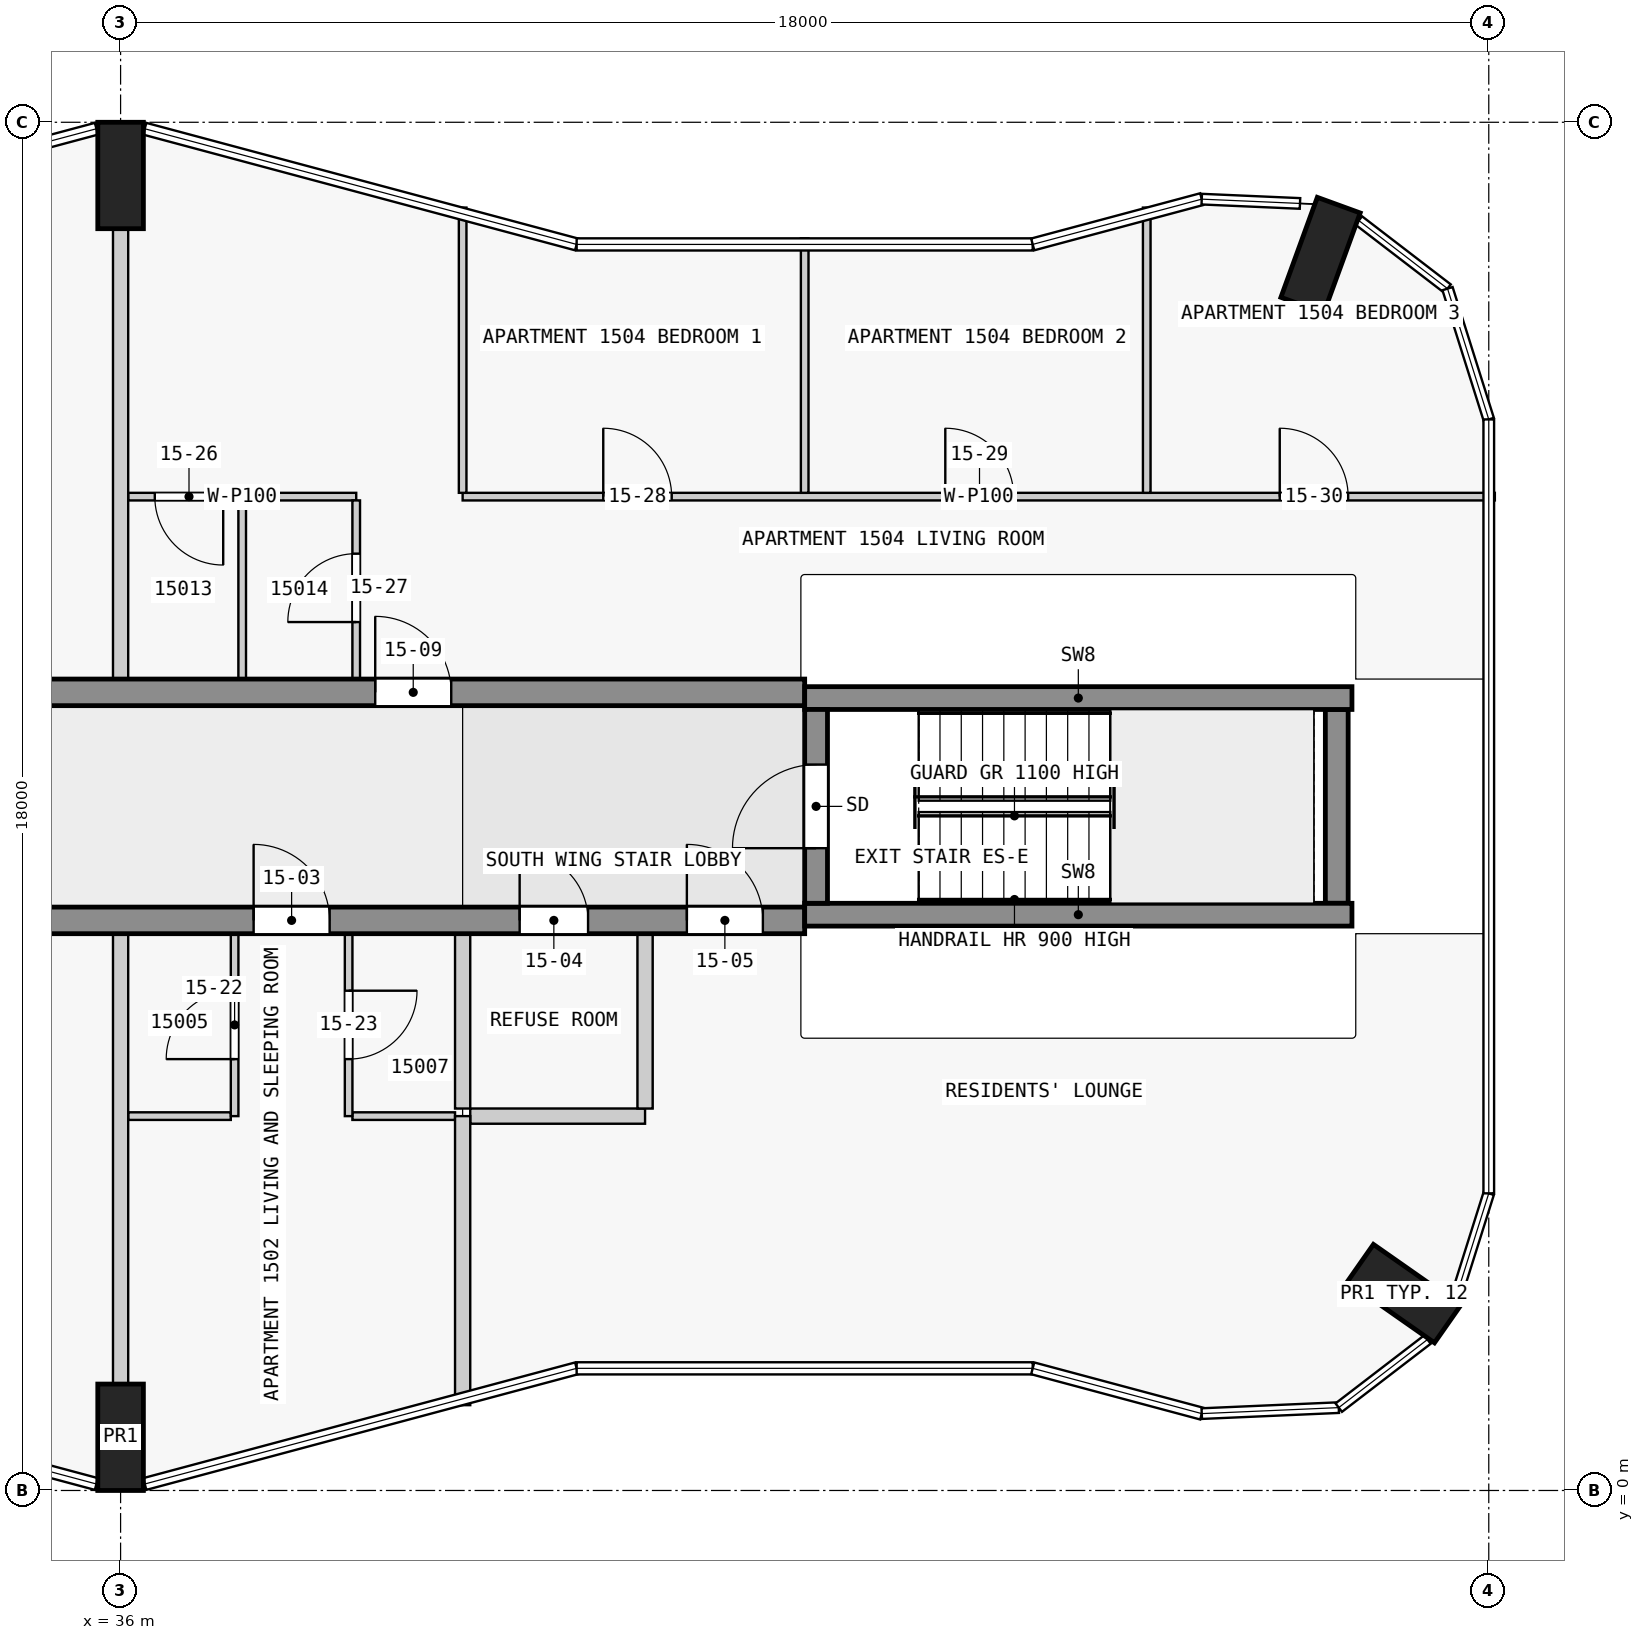
"""IFC4 building model, lengths in metres.
Left out: names, types, materials, properties, quantities, classifications, styles, units other than length and angle.
Written with IfcOpenShell. Run it as: python <this file> out.ifc"""

import sys

from ifc_helpers import new_model, si_unit, direction, frame, frame_2d, origin, origin_2d, place, context, subcontext, project, spatial, rectangle, extrude, element, fill, save


model = new_model("IFC4")
c1 = context("Model", 3, precision=1e-05, world=origin(), true_north=direction((0.0, 1.0)))
c2 = subcontext(c1, "Body", "Model", "MODEL_VIEW")
j1 = project(units=[si_unit("LENGTHUNIT", "METRE"), si_unit("PLANEANGLEUNIT", "RADIAN")], contexts=[c1])
p1 = place(None, origin())
s1 = spatial("IfcSite", under=j1, at=p1, CompositionType="ELEMENT")
p2 = place(p1, origin())
s2 = spatial("IfcBuilding", under=s1, at=p2, CompositionType="ELEMENT")
p3 = place(p2, frame((0.0, 0.0, 61.8)))
s3 = spatial("IfcBuildingStorey", under=s2, at=p3, CompositionType="ELEMENT", Elevation=61.8)
for number, where, z_axis, x_axis in (
    (1, (36.0, 0.7, 0.0), (0.0, 0.0, 1.0), (1.0, 0.0, 0.0)),
    (2, (52.884, 2.59, 0.0), (0.0, 0.0, 1.0), (0.574, 0.819, 0.0)),
    (3, (51.787, 16.252, 0.0), (0.0, 0.0, 1.0), (-0.94, 0.342, 0.0)),
    (4, (36.0, 17.3, 0.0), (0.0, 0.0, 1.0), (1.0, 0.0, 0.0)),
):
    element("IfcColumn", number, at=place(p3, frame(where, z_axis=z_axis, x_axis=x_axis)), inside=s3, PredefinedType="COLUMN", context=c2, shape_type="SweptSolid", body=[
        extrude(rectangle(XDim=0.6, YDim=1.4, at=origin_2d()), origin(), (0.0, 0.0, 1.0), 3.5),
    ])
p4 = place(p3, frame((45.15, 7.725, 0.0), z_axis=(0.0, 0.0, 1.0), x_axis=(0.0, 1.0, 0.0)))
e5 = element("IfcWall", 5, at=p4, inside=s3, PredefinedType="SHEAR", context=c2, shape_type="SweptSolid", body=[
    extrude(rectangle(XDim=2.55, YDim=0.3, at=frame_2d((1.275, 0.0))), origin(), (0.0, 0.0, 1.0), 3.5),
])
p5 = place(p4, frame((0.725, 0.0, 0.0)))
e6 = element("IfcOpeningElement", 6, at=p5, cuts=e5, PredefinedType="OPENING", context=c2, shape_type="SweptSolid", body=[
    extrude(rectangle(XDim=1.1, YDim=2.1, at=frame_2d((0.55, 1.05))), frame((0.0, 0.16, 0.0), z_axis=(0.0, -1.0, 0.0), x_axis=(1.0, 0.0, 0.0)), (0.0, 0.0, 1.0), 0.32),
])
p6 = place(p3, frame((52.0, 7.725, 0.0), z_axis=(0.0, 0.0, 1.0), x_axis=(0.0, 1.0, 0.0)))
e7 = element("IfcWall", 7, at=p6, inside=s3, PredefinedType="SHEAR", context=c2, shape_type="SweptSolid", body=[
    extrude(rectangle(XDim=2.55, YDim=0.3, at=frame_2d((1.275, 0.0))), origin(), (0.0, 0.0, 1.0), 3.5),
])
for number, where, z_axis, x_axis in (
    (8, (45.0, 7.575, 0.0), (0.0, 0.0, 1.0), (1.0, 0.0, 0.0)),
    (9, (45.0, 10.425, 0.0), (0.0, 0.0, 1.0), (1.0, 0.0, 0.0)),
):
    element("IfcWall", number, at=place(p3, frame(where, z_axis=z_axis, x_axis=x_axis)), inside=s3, PredefinedType="SHEAR", context=c2, shape_type="SweptSolid", body=[
        extrude(rectangle(XDim=7.2, YDim=0.3, at=frame_2d((3.6, 0.0))), origin(), (0.0, 0.0, 1.0), 3.5),
    ])
p7 = place(p3, frame((22.5, 7.5, 0.0), z_axis=(0.0, 0.0, 1.0), x_axis=(1.0, 0.0, 0.0)))
e10 = element("IfcWall", 10, at=p7, inside=s3, PredefinedType="SHEAR", context=c2, shape_type="SweptSolid", body=[
    extrude(rectangle(XDim=22.5, YDim=0.35, at=frame_2d((11.25, 0.0))), origin(), (0.0, 0.0, 1.0), 3.25),
])
p8 = place(p7, frame((1.75, 0.0, 0.0)))
e11 = element("IfcOpeningElement", 11, at=p8, cuts=e10, PredefinedType="OPENING", context=c2, shape_type="SweptSolid", body=[
    extrude(rectangle(XDim=1.0, YDim=2.1, at=frame_2d((0.5, 1.05))), frame((0.0, 0.185, 0.0), z_axis=(0.0, -1.0, 0.0), x_axis=(1.0, 0.0, 0.0)), (0.0, 0.0, 1.0), 0.37),
])
p9 = place(p7, frame((8.55, 0.0, 0.0)))
e12 = element("IfcOpeningElement", 12, at=p9, cuts=e10, PredefinedType="OPENING", context=c2, shape_type="SweptSolid", body=[
    extrude(rectangle(XDim=1.0, YDim=2.1, at=frame_2d((0.5, 1.05))), frame((0.0, 0.185, 0.0), z_axis=(0.0, -1.0, 0.0), x_axis=(1.0, 0.0, 0.0)), (0.0, 0.0, 1.0), 0.37),
])
p10 = place(p7, frame((15.25, 0.0, 0.0)))
e13 = element("IfcOpeningElement", 13, at=p10, cuts=e10, PredefinedType="OPENING", context=c2, shape_type="SweptSolid", body=[
    extrude(rectangle(XDim=1.0, YDim=2.1, at=frame_2d((0.5, 1.05))), frame((0.0, 0.185, 0.0), z_axis=(0.0, -1.0, 0.0), x_axis=(1.0, 0.0, 0.0)), (0.0, 0.0, 1.0), 0.37),
])
p11 = place(p7, frame((18.75, 0.0, 0.0)))
e14 = element("IfcOpeningElement", 14, at=p11, cuts=e10, PredefinedType="OPENING", context=c2, shape_type="SweptSolid", body=[
    extrude(rectangle(XDim=0.9, YDim=2.1, at=frame_2d((0.45, 1.05))), frame((0.0, 0.185, 0.0), z_axis=(0.0, -1.0, 0.0), x_axis=(1.0, 0.0, 0.0)), (0.0, 0.0, 1.0), 0.37),
])
p12 = place(p7, frame((20.95, 0.0, 0.0)))
e15 = element("IfcOpeningElement", 15, at=p12, cuts=e10, PredefinedType="OPENING", context=c2, shape_type="SweptSolid", body=[
    extrude(rectangle(XDim=1.0, YDim=2.1, at=frame_2d((0.5, 1.05))), frame((0.0, 0.185, 0.0), z_axis=(0.0, -1.0, 0.0), x_axis=(1.0, 0.0, 0.0)), (0.0, 0.0, 1.0), 0.37),
])
p13 = place(p3, frame((22.5, 10.5, 0.0), z_axis=(0.0, 0.0, 1.0), x_axis=(1.0, 0.0, 0.0)))
e16 = element("IfcWall", 16, at=p13, inside=s3, PredefinedType="SHEAR", context=c2, shape_type="SweptSolid", body=[
    extrude(rectangle(XDim=22.5, YDim=0.35, at=frame_2d((11.25, 0.0))), origin(), (0.0, 0.0, 1.0), 3.25),
])
p14 = place(p13, frame((1.75, 0.0, 0.0)))
e17 = element("IfcOpeningElement", 17, at=p14, cuts=e16, PredefinedType="OPENING", context=c2, shape_type="SweptSolid", body=[
    extrude(rectangle(XDim=1.0, YDim=2.1, at=frame_2d((0.5, 1.05))), frame((0.0, 0.185, 0.0), z_axis=(0.0, -1.0, 0.0), x_axis=(1.0, 0.0, 0.0)), (0.0, 0.0, 1.0), 0.37),
])
p15 = place(p13, frame((6.25, 0.0, 0.0)))
e18 = element("IfcOpeningElement", 18, at=p15, cuts=e16, PredefinedType="OPENING", context=c2, shape_type="SweptSolid", body=[
    extrude(rectangle(XDim=1.0, YDim=2.1, at=frame_2d((0.5, 1.05))), frame((0.0, 0.185, 0.0), z_axis=(0.0, -1.0, 0.0), x_axis=(1.0, 0.0, 0.0)), (0.0, 0.0, 1.0), 0.37),
])
p16 = place(p13, frame((10.75, 0.0, 0.0)))
e19 = element("IfcOpeningElement", 19, at=p16, cuts=e16, PredefinedType="OPENING", context=c2, shape_type="SweptSolid", body=[
    extrude(rectangle(XDim=1.0, YDim=2.1, at=frame_2d((0.5, 1.05))), frame((0.0, 0.185, 0.0), z_axis=(0.0, -1.0, 0.0), x_axis=(1.0, 0.0, 0.0)), (0.0, 0.0, 1.0), 0.37),
])
p17 = place(p13, frame((16.85, 0.0, 0.0)))
e20 = element("IfcOpeningElement", 20, at=p17, cuts=e16, PredefinedType="OPENING", context=c2, shape_type="SweptSolid", body=[
    extrude(rectangle(XDim=1.0, YDim=2.1, at=frame_2d((0.5, 1.05))), frame((0.0, 0.185, 0.0), z_axis=(0.0, -1.0, 0.0), x_axis=(1.0, 0.0, 0.0)), (0.0, 0.0, 1.0), 0.37),
])
for number, where, z_axis, x_axis in (
    (21, (36.1, 4.925, 0.0), (0.0, 0.0, 1.0), (1.0, 0.0, 0.0)),
    (22, (39.05, 4.925, 0.0), (0.0, 0.0, 1.0), (1.0, 0.0, 0.0)),
):
    element("IfcWall", number, at=place(p3, frame(where, z_axis=z_axis, x_axis=x_axis)), inside=s3, PredefinedType="PARTITIONING", context=c2, shape_type="SweptSolid", body=[
        extrude(rectangle(XDim=1.35, YDim=0.1, at=frame_2d((0.675, 0.0))), origin(), (0.0, 0.0, 1.0), 3.25),
    ])
p18 = place(p3, frame((40.6, 4.925, 0.0), z_axis=(0.0, 0.0, 1.0), x_axis=(1.0, 0.0, 0.0)))
e23 = element("IfcWall", 23, at=p18, inside=s3, PredefinedType="PARTITIONING", context=c2, shape_type="SweptSolid", body=[
    extrude(rectangle(XDim=2.3, YDim=0.2, at=frame_2d((1.15, 0.0))), origin(), (0.0, 0.0, 1.0), 3.25),
])
p19 = place(p3, frame((39.1, 13.075, 0.0), z_axis=(0.0, 0.0, 1.0), x_axis=(-1.0, 0.0, 0.0)))
e24 = element("IfcWall", 24, at=p19, inside=s3, PredefinedType="PARTITIONING", context=c2, shape_type="SweptSolid", body=[
    extrude(rectangle(XDim=3.0, YDim=0.1, at=frame_2d((1.5, 0.0))), origin(), (0.0, 0.0, 1.0), 3.25),
])
p20 = place(p19, frame((1.75, 0.0, 0.0)))
e25 = element("IfcOpeningElement", 25, at=p20, cuts=e24, PredefinedType="OPENING", context=c2, shape_type="SweptSolid", body=[
    extrude(rectangle(XDim=0.9, YDim=2.1, at=frame_2d((0.45, 1.05))), frame((0.0, 0.06, 0.0), z_axis=(0.0, -1.0, 0.0), x_axis=(1.0, 0.0, 0.0)), (0.0, 0.0, 1.0), 0.12),
])
p21 = place(p3, frame((40.5, 13.075, 0.0), z_axis=(0.0, 0.0, 1.0), x_axis=(1.0, 0.0, 0.0)))
e26 = element("IfcWall", 26, at=p21, inside=s3, PredefinedType="PARTITIONING", context=c2, shape_type="SweptSolid", body=[
    extrude(rectangle(XDim=13.58, YDim=0.1, at=frame_2d((6.79, 0.0))), origin(), (0.0, 0.0, 1.0), 3.25),
])
p22 = place(p21, frame((1.85, 0.0, 0.0)))
e27 = element("IfcOpeningElement", 27, at=p22, cuts=e26, PredefinedType="OPENING", context=c2, shape_type="SweptSolid", body=[
    extrude(rectangle(XDim=0.9, YDim=2.1, at=frame_2d((0.45, 1.05))), frame((0.0, 0.06, 0.0), z_axis=(0.0, -1.0, 0.0), x_axis=(1.0, 0.0, 0.0)), (0.0, 0.0, 1.0), 0.12),
])
p23 = place(p21, frame((6.35, 0.0, 0.0)))
e28 = element("IfcOpeningElement", 28, at=p23, cuts=e26, PredefinedType="OPENING", context=c2, shape_type="SweptSolid", body=[
    extrude(rectangle(XDim=0.9, YDim=2.1, at=frame_2d((0.45, 1.05))), frame((0.0, 0.06, 0.0), z_axis=(0.0, -1.0, 0.0), x_axis=(1.0, 0.0, 0.0)), (0.0, 0.0, 1.0), 0.12),
])
p24 = place(p21, frame((10.75, 0.0, 0.0)))
e29 = element("IfcOpeningElement", 29, at=p24, cuts=e26, PredefinedType="OPENING", context=c2, shape_type="SweptSolid", body=[
    extrude(rectangle(XDim=0.9, YDim=2.1, at=frame_2d((0.45, 1.05))), frame((0.0, 0.06, 0.0), z_axis=(0.0, -1.0, 0.0), x_axis=(1.0, 0.0, 0.0)), (0.0, 0.0, 1.0), 0.12),
])
for number, where, z_axis, x_axis in (
    (30, (36.0, 1.4, 0.0), (0.0, 0.0, 1.0), (0.0, 1.0, 0.0)),
    (31, (36.0, 10.675, 0.0), (0.0, 0.0, 1.0), (0.0, 1.0, 0.0)),
):
    element("IfcWall", number, at=place(p3, frame(where, z_axis=z_axis, x_axis=x_axis)), inside=s3, PredefinedType="PARTITIONING", context=c2, shape_type="SweptSolid", body=[
        extrude(rectangle(XDim=5.925, YDim=0.2, at=frame_2d((2.962, 0.0))), origin(), (0.0, 0.0, 1.0), 3.25),
    ])
p25 = place(p3, frame((37.5, 4.925, 0.0), z_axis=(0.0, 0.0, 1.0), x_axis=(0.0, 1.0, 0.0)))
e32 = element("IfcWall", 32, at=p25, inside=s3, PredefinedType="PARTITIONING", context=c2, shape_type="SweptSolid", body=[
    extrude(rectangle(XDim=2.4, YDim=0.1, at=frame_2d((1.2, 0.0))), origin(), (0.0, 0.0, 1.0), 3.25),
])
p26 = place(p25, frame((0.75, 0.0, 0.0)))
e33 = element("IfcOpeningElement", 33, at=p26, cuts=e32, PredefinedType="OPENING", context=c2, shape_type="SweptSolid", body=[
    extrude(rectangle(XDim=0.9, YDim=2.1, at=frame_2d((0.45, 1.05))), frame((0.0, 0.06, 0.0), z_axis=(0.0, -1.0, 0.0), x_axis=(1.0, 0.0, 0.0)), (0.0, 0.0, 1.0), 0.12),
])
p27 = place(p3, frame((37.6, 10.675, 0.0), z_axis=(0.0, 0.0, 1.0), x_axis=(0.0, 1.0, 0.0)))
e34 = element("IfcWall", 34, at=p27, inside=s3, PredefinedType="PARTITIONING", context=c2, shape_type="SweptSolid", body=[
    extrude(rectangle(XDim=2.35, YDim=0.1, at=frame_2d((1.175, 0.0))), origin(), (0.0, 0.0, 1.0), 3.25),
])
p28 = place(p3, frame((39.0, 7.325, 0.0), z_axis=(0.0, 0.0, 1.0), x_axis=(0.0, -1.0, 0.0)))
e35 = element("IfcWall", 35, at=p28, inside=s3, PredefinedType="PARTITIONING", context=c2, shape_type="SweptSolid", body=[
    extrude(rectangle(XDim=2.4, YDim=0.1, at=frame_2d((1.2, 0.0))), origin(), (0.0, 0.0, 1.0), 3.25),
])
p29 = place(p28, frame((0.75, 0.0, 0.0)))
e36 = element("IfcOpeningElement", 36, at=p29, cuts=e35, PredefinedType="OPENING", context=c2, shape_type="SweptSolid", body=[
    extrude(rectangle(XDim=0.9, YDim=2.1, at=frame_2d((0.45, 1.05))), frame((0.0, 0.06, 0.0), z_axis=(0.0, -1.0, 0.0), x_axis=(1.0, 0.0, 0.0)), (0.0, 0.0, 1.0), 0.12),
])
p30 = place(p3, frame((39.1, 10.675, 0.0), z_axis=(0.0, 0.0, 1.0), x_axis=(0.0, 1.0, 0.0)))
e37 = element("IfcWall", 37, at=p30, inside=s3, PredefinedType="PARTITIONING", context=c2, shape_type="SweptSolid", body=[
    extrude(rectangle(XDim=2.35, YDim=0.1, at=frame_2d((1.175, 0.0))), origin(), (0.0, 0.0, 1.0), 3.25),
])
p31 = place(p30, frame((0.75, 0.0, 0.0)))
e38 = element("IfcOpeningElement", 38, at=p31, cuts=e37, PredefinedType="OPENING", context=c2, shape_type="SweptSolid", body=[
    extrude(rectangle(XDim=0.9, YDim=2.1, at=frame_2d((0.45, 1.05))), frame((0.0, 0.06, 0.0), z_axis=(0.0, -1.0, 0.0), x_axis=(1.0, 0.0, 0.0)), (0.0, 0.0, 1.0), 0.12),
])
p32 = place(p3, frame((40.5, 16.878, 0.0), z_axis=(0.0, 0.0, 1.0), x_axis=(0.0, -1.0, 0.0)))
e39 = element("IfcWall", 39, at=p32, inside=s3, PredefinedType="PARTITIONING", context=c2, shape_type="SweptSolid", body=[
    extrude(rectangle(XDim=3.753, YDim=0.1, at=frame_2d((1.876, 0.0))), origin(), (0.0, 0.0, 1.0), 3.25),
])
p33 = place(p3, frame((40.5, 4.925, 0.0), z_axis=(0.0, 0.0, 1.0), x_axis=(0.0, -1.0, 0.0)))
e40 = element("IfcWall", 40, at=p33, inside=s3, PredefinedType="PARTITIONING", context=c2, shape_type="SweptSolid", body=[
    extrude(rectangle(XDim=3.803, YDim=0.2, at=frame_2d((1.901, 0.0))), origin(), (0.0, 0.0, 1.0), 3.25),
])
for number, where, z_axis, x_axis in (
    (41, (40.5, 5.025, 0.0), (0.0, 0.0, 1.0), (0.0, 1.0, 0.0)),
    (42, (42.9, 5.025, 0.0), (0.0, 0.0, 1.0), (0.0, 1.0, 0.0)),
):
    element("IfcWall", number, at=place(p3, frame(where, z_axis=z_axis, x_axis=x_axis)), inside=s3, PredefinedType="PARTITIONING", context=c2, shape_type="SweptSolid", body=[
        extrude(rectangle(XDim=2.3, YDim=0.2, at=frame_2d((1.15, 0.0))), origin(), (0.0, 0.0, 1.0), 3.25),
    ])
p34 = place(p3, frame((45.0, 13.125, 0.0), z_axis=(0.0, 0.0, 1.0), x_axis=(0.0, 1.0, 0.0)))
e43 = element("IfcWall", 43, at=p34, inside=s3, PredefinedType="PARTITIONING", context=c2, shape_type="SweptSolid", body=[
    extrude(rectangle(XDim=3.348, YDim=0.1, at=frame_2d((1.674, 0.0))), origin(), (0.0, 0.0, 1.0), 3.25),
])
p35 = place(p3, frame((49.5, 13.125, 0.0), z_axis=(0.0, 0.0, 1.0), x_axis=(0.0, 1.0, 0.0)))
e44 = element("IfcWall", 44, at=p35, inside=s3, PredefinedType="PARTITIONING", context=c2, shape_type="SweptSolid", body=[
    extrude(rectangle(XDim=3.753, YDim=0.1, at=frame_2d((1.876, 0.0))), origin(), (0.0, 0.0, 1.0), 3.25),
])
p36 = place(p5, origin())
e45 = element("IfcDoor", 45, at=p36, inside=s3, OperationType="SINGLE_SWING_LEFT", PredefinedType="DOOR", context=c2, shape_type="SweptSolid", body=[
    extrude(rectangle(XDim=1.1, YDim=2.1, at=frame_2d((0.55, 1.05))), frame((0.0, 0.025, 0.0), z_axis=(0.0, -1.0, 0.0), x_axis=(1.0, 0.0, 0.0)), (0.0, 0.0, 1.0), 0.05),
])
fill(e6, e45)
p37 = place(p10, origin())
e46 = element("IfcDoor", 46, at=p37, inside=s3, OperationType="SINGLE_SWING_RIGHT", PredefinedType="DOOR", context=c2, shape_type="SweptSolid", body=[
    extrude(rectangle(XDim=1.0, YDim=2.1, at=frame_2d((0.5, 1.05))), frame((0.0, 0.025, 0.0), z_axis=(0.0, -1.0, 0.0), x_axis=(1.0, 0.0, 0.0)), (0.0, 0.0, 1.0), 0.05),
])
fill(e13, e46)
p38 = place(p11, origin())
e47 = element("IfcDoor", 47, at=p38, inside=s3, OperationType="SINGLE_SWING_RIGHT", PredefinedType="DOOR", context=c2, shape_type="SweptSolid", body=[
    extrude(rectangle(XDim=0.9, YDim=2.1, at=frame_2d((0.45, 1.05))), frame((0.0, 0.025, 0.0), z_axis=(0.0, -1.0, 0.0), x_axis=(1.0, 0.0, 0.0)), (0.0, 0.0, 1.0), 0.05),
])
fill(e14, e47)
p39 = place(p12, origin())
e48 = element("IfcDoor", 48, at=p39, inside=s3, OperationType="SINGLE_SWING_RIGHT", PredefinedType="DOOR", context=c2, shape_type="SweptSolid", body=[
    extrude(rectangle(XDim=1.0, YDim=2.1, at=frame_2d((0.5, 1.05))), frame((0.0, 0.025, 0.0), z_axis=(0.0, -1.0, 0.0), x_axis=(1.0, 0.0, 0.0)), (0.0, 0.0, 1.0), 0.05),
])
fill(e15, e48)
p40 = place(p17, origin())
e49 = element("IfcDoor", 49, at=p40, inside=s3, OperationType="SINGLE_SWING_RIGHT", PredefinedType="DOOR", context=c2, shape_type="SweptSolid", body=[
    extrude(rectangle(XDim=1.0, YDim=2.1, at=frame_2d((0.5, 1.05))), frame((0.0, 0.025, 0.0), z_axis=(0.0, -1.0, 0.0), x_axis=(1.0, 0.0, 0.0)), (0.0, 0.0, 1.0), 0.05),
])
fill(e20, e49)
p41 = place(p26, origin())
e50 = element("IfcDoor", 50, at=p41, inside=s3, OperationType="SINGLE_SWING_LEFT", PredefinedType="DOOR", context=c2, shape_type="SweptSolid", body=[
    extrude(rectangle(XDim=0.9, YDim=2.1, at=frame_2d((0.45, 1.05))), frame((0.0, 0.025, 0.0), z_axis=(0.0, -1.0, 0.0), x_axis=(1.0, 0.0, 0.0)), (0.0, 0.0, 1.0), 0.05),
])
fill(e33, e50)
p42 = place(p29, origin())
e51 = element("IfcDoor", 51, at=p42, inside=s3, OperationType="SINGLE_SWING_LEFT", PredefinedType="DOOR", context=c2, shape_type="SweptSolid", body=[
    extrude(rectangle(XDim=0.9, YDim=2.1, at=frame_2d((0.45, 1.05))), frame((0.0, 0.025, 0.0), z_axis=(0.0, -1.0, 0.0), x_axis=(1.0, 0.0, 0.0)), (0.0, 0.0, 1.0), 0.05),
])
fill(e36, e51)
p43 = place(p20, origin())
e52 = element("IfcDoor", 52, at=p43, inside=s3, OperationType="SINGLE_SWING_RIGHT", PredefinedType="DOOR", context=c2, shape_type="SweptSolid", body=[
    extrude(rectangle(XDim=0.9, YDim=2.1, at=frame_2d((0.45, 1.05))), frame((0.0, 0.025, 0.0), z_axis=(0.0, -1.0, 0.0), x_axis=(1.0, 0.0, 0.0)), (0.0, 0.0, 1.0), 0.05),
])
fill(e25, e52)
p44 = place(p31, origin())
e53 = element("IfcDoor", 53, at=p44, inside=s3, OperationType="SINGLE_SWING_RIGHT", PredefinedType="DOOR", context=c2, shape_type="SweptSolid", body=[
    extrude(rectangle(XDim=0.9, YDim=2.1, at=frame_2d((0.45, 1.05))), frame((0.0, 0.025, 0.0), z_axis=(0.0, -1.0, 0.0), x_axis=(1.0, 0.0, 0.0)), (0.0, 0.0, 1.0), 0.05),
])
fill(e38, e53)
p45 = place(p22, origin())
e54 = element("IfcDoor", 54, at=p45, inside=s3, OperationType="SINGLE_SWING_LEFT", PredefinedType="DOOR", context=c2, shape_type="SweptSolid", body=[
    extrude(rectangle(XDim=0.9, YDim=2.1, at=frame_2d((0.45, 1.05))), frame((0.0, 0.025, 0.0), z_axis=(0.0, -1.0, 0.0), x_axis=(1.0, 0.0, 0.0)), (0.0, 0.0, 1.0), 0.05),
])
fill(e27, e54)
p46 = place(p23, origin())
e55 = element("IfcDoor", 55, at=p46, inside=s3, OperationType="SINGLE_SWING_RIGHT", PredefinedType="DOOR", context=c2, shape_type="SweptSolid", body=[
    extrude(rectangle(XDim=0.9, YDim=2.1, at=frame_2d((0.45, 1.05))), frame((0.0, 0.025, 0.0), z_axis=(0.0, -1.0, 0.0), x_axis=(1.0, 0.0, 0.0)), (0.0, 0.0, 1.0), 0.05),
])
fill(e28, e55)
p47 = place(p24, origin())
e56 = element("IfcDoor", 56, at=p47, inside=s3, OperationType="SINGLE_SWING_RIGHT", PredefinedType="DOOR", context=c2, shape_type="SweptSolid", body=[
    extrude(rectangle(XDim=0.9, YDim=2.1, at=frame_2d((0.45, 1.05))), frame((0.0, 0.025, 0.0), z_axis=(0.0, -1.0, 0.0), x_axis=(1.0, 0.0, 0.0)), (0.0, 0.0, 1.0), 0.05),
])
fill(e29, e56)
save(model, sys.argv[1])
